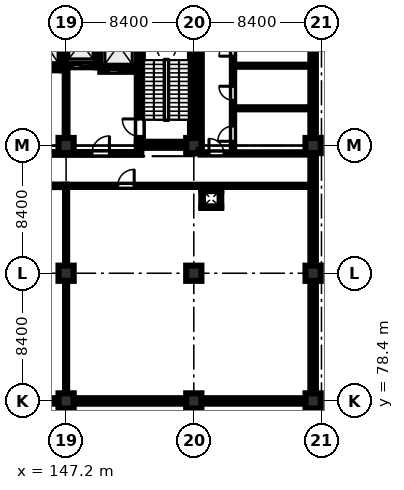
"""IFC4 building model, lengths in metres.
Left out: names, types, materials, properties, quantities, classifications, styles, units other than length and angle.
Written with IfcOpenShell. Run it as: python <this file> out.ifc"""

import sys

from ifc_helpers import new_model, si_unit, direction, frame, frame_2d, origin, origin_2d, place, context, subcontext, project, spatial, rectangle, extrude, element, fill, save


model = new_model("IFC4")
c1 = context("Model", 3, precision=1e-05, world=origin(), true_north=direction((0.0, 1.0)))
c2 = subcontext(c1, "Body", "Model", "MODEL_VIEW")
j1 = project(units=[si_unit("LENGTHUNIT", "METRE"), si_unit("PLANEANGLEUNIT", "RADIAN")], contexts=[c1])
p1 = place(None, origin())
s1 = spatial("IfcSite", under=j1, at=p1, CompositionType="ELEMENT")
p2 = place(p1, origin())
s2 = spatial("IfcBuilding", under=s1, at=p2, CompositionType="ELEMENT")
p3 = place(p2, frame((0.0, 0.0, 5.4)))
s3 = spatial("IfcBuildingStorey", under=s2, at=p3, CompositionType="ELEMENT", Elevation=5.4)
for number, where, z_axis, x_axis in (
    (1, (147.2, 78.4, 0.0), (0.0, 0.0, 1.0), (1.0, 0.0, 0.0)),
    (2, (147.2, 86.8, 0.0), (0.0, 0.0, 1.0), (1.0, 0.0, 0.0)),
    (3, (147.2, 95.2, 0.0), (0.0, 0.0, 1.0), (1.0, 0.0, 0.0)),
    (4, (155.6, 78.4, 0.0), (0.0, 0.0, 1.0), (1.0, 0.0, 0.0)),
    (5, (155.6, 86.8, 0.0), (0.0, 0.0, 1.0), (1.0, 0.0, 0.0)),
    (6, (155.6, 95.2, 0.0), (0.0, 0.0, 1.0), (1.0, 0.0, 0.0)),
    (7, (163.45, 78.4, 0.0), (0.0, 0.0, 1.0), (1.0, 0.0, 0.0)),
    (8, (163.45, 86.8, 0.0), (0.0, 0.0, 1.0), (1.0, 0.0, 0.0)),
    (9, (163.45, 95.2, 0.0), (0.0, 0.0, 1.0), (1.0, 0.0, 0.0)),
):
    element("IfcColumn", number, at=place(p3, frame(where, z_axis=z_axis, x_axis=x_axis)), inside=s3, PredefinedType="COLUMN", context=c2, shape_type="SweptSolid", body=[
        extrude(rectangle(XDim=1.0, YDim=1.0, at=origin_2d()), origin(), (0.0, 0.0, 1.0), 4.58),
    ])
p4 = place(p3, frame((151.85, 95.25, 0.0), z_axis=(0.0, 0.0, 1.0), x_axis=(1.0, 0.0, 0.0)))
e10 = element("IfcWall", 10, at=p4, inside=s3, PredefinedType="SHEAR", context=c2, shape_type="SweptSolid", body=[
    extrude(rectangle(XDim=3.9, YDim=0.4, at=frame_2d((1.95, 0.0))), origin(), (0.0, 0.0, 1.0), 4.58),
])
p5 = place(p3, frame((152.05, 95.45, 0.0), z_axis=(0.0, 0.0, 1.0), x_axis=(0.0, 1.0, 0.0)))
e11 = element("IfcWall", 11, at=p5, inside=s3, PredefinedType="SHEAR", context=c2, shape_type="SweptSolid", body=[
    extrude(rectangle(XDim=7.9, YDim=0.4, at=frame_2d((3.95, 0.0))), origin(), (0.0, 0.0, 1.0), 4.58),
])
p6 = place(p5, frame((0.35, 0.0, 0.0)))
e12 = element("IfcOpeningElement", 12, at=p6, cuts=e11, PredefinedType="OPENING", context=c2, shape_type="SweptSolid", body=[
    extrude(rectangle(XDim=1.15, YDim=2.15, at=frame_2d((0.575, 1.075))), frame((0.0, 0.21, 0.0), z_axis=(0.0, -1.0, 0.0), x_axis=(1.0, 0.0, 0.0)), (0.0, 0.0, 1.0), 0.42),
])
p7 = place(p3, frame((155.55, 95.45, 0.0), z_axis=(0.0, 0.0, 1.0), x_axis=(0.0, 1.0, 0.0)))
e13 = element("IfcWall", 13, at=p7, inside=s3, PredefinedType="SHEAR", context=c2, shape_type="SweptSolid", body=[
    extrude(rectangle(XDim=7.9, YDim=0.4, at=frame_2d((3.95, 0.0))), origin(), (0.0, 0.0, 1.0), 4.58),
])
p8 = place(p3, frame((144.85, 100.275, 0.0), z_axis=(0.0, 0.0, 1.0), x_axis=(1.0, 0.0, 0.0)))
e14 = element("IfcWall", 14, at=p8, inside=s3, PredefinedType="SHEAR", context=c2, shape_type="SweptSolid", body=[
    extrude(rectangle(XDim=2.05, YDim=0.25, at=frame_2d((1.025, 0.0))), origin(), (0.0, 0.0, 1.0), 4.58),
])
p9 = place(p8, frame((0.465, 0.0, 0.0)))
e15 = element("IfcOpeningElement", 15, at=p9, cuts=e14, PredefinedType="OPENING", context=c2, shape_type="SweptSolid", body=[
    extrude(rectangle(XDim=1.12, YDim=2.15, at=frame_2d((0.56, 1.075))), frame((0.0, 0.135, 0.0), z_axis=(0.0, -1.0, 0.0), x_axis=(1.0, 0.0, 0.0)), (0.0, 0.0, 1.0), 0.27),
])
p10 = place(p3, frame((147.025, 100.15, 0.0), z_axis=(0.0, 0.0, 1.0), x_axis=(0.0, 1.0, 0.0)))
e16 = element("IfcWall", 16, at=p10, inside=s3, PredefinedType="SHEAR", context=c2, shape_type="SweptSolid", body=[
    extrude(rectangle(XDim=3.4, YDim=0.25, at=frame_2d((1.7, 0.0))), origin(), (0.0, 0.0, 1.0), 4.58),
])
p11 = place(p3, frame((147.15, 100.475, 0.0), z_axis=(0.0, 0.0, 1.0), x_axis=(1.0, 0.0, 0.0)))
e17 = element("IfcWall", 17, at=p11, inside=s3, PredefinedType="SHEAR", context=c2, shape_type="SweptSolid", body=[
    extrude(rectangle(XDim=2.05, YDim=0.25, at=frame_2d((1.025, 0.0))), origin(), (0.0, 0.0, 1.0), 4.58),
])
p12 = place(p11, frame((0.495, 0.0, 0.0)))
e18 = element("IfcOpeningElement", 18, at=p12, cuts=e17, PredefinedType="OPENING", context=c2, shape_type="SweptSolid", body=[
    extrude(rectangle(XDim=1.06, YDim=2.15, at=frame_2d((0.53, 1.075))), frame((0.0, 0.135, 0.0), z_axis=(0.0, -1.0, 0.0), x_axis=(1.0, 0.0, 0.0)), (0.0, 0.0, 1.0), 0.27),
])
p13 = place(p3, frame((149.325, 100.35, 0.0), z_axis=(0.0, 0.0, 1.0), x_axis=(0.0, 1.0, 0.0)))
e19 = element("IfcWall", 19, at=p13, inside=s3, PredefinedType="SHEAR", context=c2, shape_type="SweptSolid", body=[
    extrude(rectangle(XDim=3.2, YDim=0.25, at=frame_2d((1.6, 0.0))), origin(), (0.0, 0.0, 1.0), 4.58),
])
p14 = place(p3, frame((149.45, 100.175, 0.0), z_axis=(0.0, 0.0, 1.0), x_axis=(1.0, 0.0, 0.0)))
e20 = element("IfcWall", 20, at=p14, inside=s3, PredefinedType="SHEAR", context=c2, shape_type="SweptSolid", body=[
    extrude(rectangle(XDim=2.4, YDim=0.25, at=frame_2d((1.2, 0.0))), origin(), (0.0, 0.0, 1.0), 4.58),
])
p15 = place(p14, frame((0.55, 0.0, 0.0)))
e21 = element("IfcOpeningElement", 21, at=p15, cuts=e20, PredefinedType="OPENING", context=c2, shape_type="SweptSolid", body=[
    extrude(rectangle(XDim=1.3, YDim=2.25, at=frame_2d((0.65, 1.125))), frame((0.0, 0.135, 0.0), z_axis=(0.0, -1.0, 0.0), x_axis=(1.0, 0.0, 0.0)), (0.0, 0.0, 1.0), 0.27),
])
p16 = place(p3, frame((146.7, 78.4, 0.0), z_axis=(0.0, 0.0, 1.0), x_axis=(-1.0, 0.0, 0.0)))
e22 = element("IfcWall", 22, at=p16, inside=s3, PredefinedType="STANDARD", context=c2, shape_type="SweptSolid", body=[
    extrude(rectangle(XDim=7.4, YDim=0.36, at=frame_2d((3.7, 0.0))), origin(), (0.0, 0.0, 1.0), 3.83),
])
p17 = place(p16, frame((1.15, 0.0, 0.95)))
e23 = element("IfcOpeningElement", 23, at=p17, cuts=e22, PredefinedType="OPENING", context=c2, shape_type="SweptSolid", body=[
    extrude(rectangle(XDim=1.5, YDim=1.5, at=frame_2d((0.75, 0.75))), frame((0.0, 0.19, 0.0), z_axis=(0.0, -1.0, 0.0), x_axis=(1.0, 0.0, 0.0)), (0.0, 0.0, 1.0), 0.38),
])
p18 = place(p3, frame((155.1, 78.4, 0.0), z_axis=(0.0, 0.0, 1.0), x_axis=(-1.0, 0.0, 0.0)))
e24 = element("IfcWall", 24, at=p18, inside=s3, PredefinedType="STANDARD", context=c2, shape_type="SweptSolid", body=[
    extrude(rectangle(XDim=7.4, YDim=0.36, at=frame_2d((3.7, 0.0))), origin(), (0.0, 0.0, 1.0), 3.83),
])
p19 = place(p18, frame((1.15, 0.0, 0.95)))
e25 = element("IfcOpeningElement", 25, at=p19, cuts=e24, PredefinedType="OPENING", context=c2, shape_type="SweptSolid", body=[
    extrude(rectangle(XDim=1.5, YDim=1.5, at=frame_2d((0.75, 0.75))), frame((0.0, 0.19, 0.0), z_axis=(0.0, -1.0, 0.0), x_axis=(1.0, 0.0, 0.0)), (0.0, 0.0, 1.0), 0.38),
])
p20 = place(p3, frame((162.95, 78.4, 0.0), z_axis=(0.0, 0.0, 1.0), x_axis=(-1.0, 0.0, 0.0)))
e26 = element("IfcWall", 26, at=p20, inside=s3, PredefinedType="STANDARD", context=c2, shape_type="SweptSolid", body=[
    extrude(rectangle(XDim=6.85, YDim=0.36, at=frame_2d((3.425, 0.0))), origin(), (0.0, 0.0, 1.0), 3.83),
])
p21 = place(p20, frame((1.15, 0.0, 0.95)))
e27 = element("IfcOpeningElement", 27, at=p21, cuts=e26, PredefinedType="OPENING", context=c2, shape_type="SweptSolid", body=[
    extrude(rectangle(XDim=1.5, YDim=1.5, at=frame_2d((0.75, 0.75))), frame((0.0, 0.19, 0.0), z_axis=(0.0, -1.0, 0.0), x_axis=(1.0, 0.0, 0.0)), (0.0, 0.0, 1.0), 0.38),
])
p22 = place(p3, frame((163.45, 86.3, 0.0), z_axis=(0.0, 0.0, 1.0), x_axis=(0.0, -1.0, 0.0)))
e28 = element("IfcWall", 28, at=p22, inside=s3, PredefinedType="STANDARD", context=c2, shape_type="SweptSolid", body=[
    extrude(rectangle(XDim=7.4, YDim=0.36, at=frame_2d((3.7, 0.0))), origin(), (0.0, 0.0, 1.0), 3.83),
])
p23 = place(p22, frame((1.15, 0.0, 1.1)))
e29 = element("IfcOpeningElement", 29, at=p23, cuts=e28, PredefinedType="OPENING", context=c2, shape_type="SweptSolid", body=[
    extrude(rectangle(XDim=1.8, YDim=1.8, at=frame_2d((0.9, 0.9))), frame((0.0, 0.19, 0.0), z_axis=(0.0, -1.0, 0.0), x_axis=(1.0, 0.0, 0.0)), (0.0, 0.0, 1.0), 0.38),
])
p24 = place(p3, frame((163.45, 94.7, 0.0), z_axis=(0.0, 0.0, 1.0), x_axis=(0.0, -1.0, 0.0)))
e30 = element("IfcWall", 30, at=p24, inside=s3, PredefinedType="STANDARD", context=c2, shape_type="SweptSolid", body=[
    extrude(rectangle(XDim=7.4, YDim=0.36, at=frame_2d((3.7, 0.0))), origin(), (0.0, 0.0, 1.0), 3.83),
])
p25 = place(p24, frame((4.2, 0.0, 1.1)))
e31 = element("IfcOpeningElement", 31, at=p25, cuts=e30, PredefinedType="OPENING", context=c2, shape_type="SweptSolid", body=[
    extrude(rectangle(XDim=1.8, YDim=1.8, at=frame_2d((0.9, 0.9))), frame((0.0, 0.19, 0.0), z_axis=(0.0, -1.0, 0.0), x_axis=(1.0, 0.0, 0.0)), (0.0, 0.0, 1.0), 0.38),
])
p26 = place(p3, frame((163.45, 103.1, 0.0), z_axis=(0.0, 0.0, 1.0), x_axis=(0.0, -1.0, 0.0)))
e32 = element("IfcWall", 32, at=p26, inside=s3, PredefinedType="STANDARD", context=c2, shape_type="SweptSolid", body=[
    extrude(rectangle(XDim=7.4, YDim=0.36, at=frame_2d((3.7, 0.0))), origin(), (0.0, 0.0, 1.0), 3.83),
])
p27 = place(p26, frame((1.15, 0.0, 1.1)))
e33 = element("IfcOpeningElement", 33, at=p27, cuts=e32, PredefinedType="OPENING", context=c2, shape_type="SweptSolid", body=[
    extrude(rectangle(XDim=1.4, YDim=1.4, at=frame_2d((0.7, 0.7))), frame((0.0, 0.19, 0.0), z_axis=(0.0, -1.0, 0.0), x_axis=(1.0, 0.0, 0.0)), (0.0, 0.0, 1.0), 0.38),
])
for number, where, z_axis, x_axis in (
    (34, (147.185, 49.68, 0.0), (0.0, 0.0, 1.0), (0.0, 1.0, 0.0)),
    (35, (155.615, 78.22, 0.0), (0.0, 0.0, 1.0), (0.0, -1.0, 0.0)),
):
    element("IfcWall", number, at=place(p3, frame(where, z_axis=z_axis, x_axis=x_axis)), inside=s3, PredefinedType="PARAPET", context=c2, shape_type="SweptSolid", body=[
        extrude(rectangle(XDim=28.54, YDim=0.19, at=frame_2d((14.27, 0.0))), origin(), (0.0, 0.0, 1.0), 1.2),
    ])
p28 = place(p3, frame((142.3, 94.68, 0.0), z_axis=(0.0, 0.0, 1.0), x_axis=(1.0, 0.0, 0.0)))
e36 = element("IfcWall", 36, at=p28, inside=s3, PredefinedType="STANDARD", context=c2, shape_type="SweptSolid", body=[
    extrude(rectangle(XDim=4.8, YDim=0.18, at=frame_2d((2.4, 0.0))), origin(), (0.0, 0.0, 1.0), 4.58),
])
p29 = place(p28, frame((1.6, 0.0, 0.0)))
e37 = element("IfcOpeningElement", 37, at=p29, cuts=e36, PredefinedType="OPENING", context=c2, shape_type="SweptSolid", body=[
    extrude(rectangle(XDim=1.15, YDim=2.15, at=frame_2d((0.575, 1.075))), frame((0.0, 0.1, 0.0), z_axis=(0.0, -1.0, 0.0), x_axis=(1.0, 0.0, 0.0)), (0.0, 0.0, 1.0), 0.2),
])
p30 = place(p3, frame((147.3, 94.68, 0.0), z_axis=(0.0, 0.0, 1.0), x_axis=(1.0, 0.0, 0.0)))
e38 = element("IfcWall", 38, at=p30, inside=s3, PredefinedType="STANDARD", context=c2, shape_type="SweptSolid", body=[
    extrude(rectangle(XDim=4.85, YDim=0.18, at=frame_2d((2.425, 0.0))), origin(), (0.0, 0.0, 1.0), 4.58),
])
p31 = place(p30, frame((1.6, 0.0, 0.0)))
e39 = element("IfcOpeningElement", 39, at=p31, cuts=e38, PredefinedType="OPENING", context=c2, shape_type="SweptSolid", body=[
    extrude(rectangle(XDim=1.15, YDim=2.15, at=frame_2d((0.575, 1.075))), frame((0.0, 0.1, 0.0), z_axis=(0.0, -1.0, 0.0), x_axis=(1.0, 0.0, 0.0)), (0.0, 0.0, 1.0), 0.2),
])
p32 = place(p3, frame((147.2, 95.75, 0.0), z_axis=(0.0, 0.0, 1.0), x_axis=(0.0, 1.0, 0.0)))
e40 = element("IfcWall", 40, at=p32, inside=s3, PredefinedType="STANDARD", context=c2, shape_type="SweptSolid", body=[
    extrude(rectangle(XDim=4.5, YDim=0.18, at=frame_2d((2.25, 0.0))), origin(), (0.0, 0.0, 1.0), 3.83),
])
p33 = place(p3, frame((156.05, 94.68, 0.0), z_axis=(0.0, 0.0, 1.0), x_axis=(1.0, 0.0, 0.0)))
e41 = element("IfcWall", 41, at=p33, inside=s3, PredefinedType="PARTITIONING", context=c2, shape_type="SweptSolid", body=[
    extrude(rectangle(XDim=7.15, YDim=0.15, at=frame_2d((3.575, 0.0))), origin(), (0.0, 0.0, 1.0), 4.58),
])
p34 = place(p33, frame((0.55, 0.0, 0.0)))
e42 = element("IfcOpeningElement", 42, at=p34, cuts=e41, PredefinedType="OPENING", context=c2, shape_type="SweptSolid", body=[
    extrude(rectangle(XDim=0.98, YDim=2.12, at=frame_2d((0.49, 1.06))), frame((0.0, 0.085, 0.0), z_axis=(0.0, -1.0, 0.0), x_axis=(1.0, 0.0, 0.0)), (0.0, 0.0, 1.0), 0.17),
])
p35 = place(p3, frame((158.18, 94.68, 0.0), z_axis=(0.0, 0.0, 1.0), x_axis=(0.0, 1.0, 0.0)))
e43 = element("IfcWall", 43, at=p35, inside=s3, PredefinedType="PARTITIONING", context=c2, shape_type="SweptSolid", body=[
    extrude(rectangle(XDim=8.57, YDim=0.15, at=frame_2d((4.285, 0.0))), origin(), (0.0, 0.0, 1.0), 4.58),
])
p36 = place(p35, frame((0.8, 0.0, 0.0)))
e44 = element("IfcOpeningElement", 44, at=p36, cuts=e43, PredefinedType="OPENING", context=c2, shape_type="SweptSolid", body=[
    extrude(rectangle(XDim=1.0, YDim=2.12, at=frame_2d((0.5, 1.06))), frame((0.0, 0.085, 0.0), z_axis=(0.0, -1.0, 0.0), x_axis=(1.0, 0.0, 0.0)), (0.0, 0.0, 1.0), 0.17),
])
p37 = place(p35, frame((3.5, 0.0, 0.0)))
e45 = element("IfcOpeningElement", 45, at=p37, cuts=e43, PredefinedType="OPENING", context=c2, shape_type="SweptSolid", body=[
    extrude(rectangle(XDim=0.92, YDim=2.1, at=frame_2d((0.46, 1.05))), frame((0.0, 0.085, 0.0), z_axis=(0.0, -1.0, 0.0), x_axis=(1.0, 0.0, 0.0)), (0.0, 0.0, 1.0), 0.17),
])
p38 = place(p35, frame((6.4, 0.0, 0.0)))
e46 = element("IfcOpeningElement", 46, at=p38, cuts=e43, PredefinedType="OPENING", context=c2, shape_type="SweptSolid", body=[
    extrude(rectangle(XDim=0.92, YDim=2.1, at=frame_2d((0.46, 1.05))), frame((0.0, 0.085, 0.0), z_axis=(0.0, -1.0, 0.0), x_axis=(1.0, 0.0, 0.0)), (0.0, 0.0, 1.0), 0.17),
])
for number, where, z_axis, x_axis in (
    (47, (158.18, 97.65, 0.0), (0.0, 0.0, 1.0), (1.0, 0.0, 0.0)),
    (48, (158.18, 100.45, 0.0), (0.0, 0.0, 1.0), (1.0, 0.0, 0.0)),
):
    element("IfcWall", number, at=place(p3, frame(where, z_axis=z_axis, x_axis=x_axis)), inside=s3, PredefinedType="PARTITIONING", context=c2, shape_type="SweptSolid", body=[
        extrude(rectangle(XDim=5.02, YDim=0.135, at=frame_2d((2.51, 0.0))), origin(), (0.0, 0.0, 1.0), 4.58),
    ])
p39 = place(p3, frame((156.05, 94.68, 0.0), z_axis=(0.0, 0.0, 1.0), x_axis=(0.0, 1.0, 0.0)))
e49 = element("IfcWall", 49, at=p39, inside=s3, PredefinedType="PARTITIONING", context=c2, shape_type="SweptSolid", body=[
    extrude(rectangle(XDim=8.57, YDim=0.15, at=frame_2d((4.285, 0.0))), origin(), (0.0, 0.0, 1.0), 4.58),
])
p40 = place(p3, frame((134.6, 92.55, 0.0), z_axis=(0.0, 0.0, 1.0), x_axis=(1.0, 0.0, 0.0)))
e50 = element("IfcWall", 50, at=p40, inside=s3, PredefinedType="PARTITIONING", context=c2, shape_type="SweptSolid", body=[
    extrude(rectangle(XDim=12.6, YDim=0.165, at=frame_2d((6.3, 0.0))), origin(), (0.0, 0.0, 1.0), 4.58),
])
p41 = place(p40, frame((6.8, 0.0, 0.0)))
e51 = element("IfcOpeningElement", 51, at=p41, cuts=e50, PredefinedType="OPENING", context=c2, shape_type="SweptSolid", body=[
    extrude(rectangle(XDim=1.7, YDim=2.2, at=frame_2d((0.85, 1.1))), frame((0.0, 0.093, 0.0), z_axis=(0.0, -1.0, 0.0), x_axis=(1.0, 0.0, 0.0)), (0.0, 0.0, 1.0), 0.185),
])
p42 = place(p3, frame((147.2, 92.55, 0.0), z_axis=(0.0, 0.0, 1.0), x_axis=(1.0, 0.0, 0.0)))
e52 = element("IfcWall", 52, at=p42, inside=s3, PredefinedType="PARTITIONING", context=c2, shape_type="SweptSolid", body=[
    extrude(rectangle(XDim=16.15, YDim=0.145, at=frame_2d((8.075, 0.0))), origin(), (0.0, 0.0, 1.0), 4.58),
])
p43 = place(p42, frame((3.4, 0.0, 0.0)))
e53 = element("IfcOpeningElement", 53, at=p43, cuts=e52, PredefinedType="OPENING", context=c2, shape_type="SweptSolid", body=[
    extrude(rectangle(XDim=1.08, YDim=2.15, at=frame_2d((0.54, 1.075))), frame((0.0, 0.083, 0.0), z_axis=(0.0, -1.0, 0.0), x_axis=(1.0, 0.0, 0.0)), (0.0, 0.0, 1.0), 0.165),
])
p44 = place(p3, frame((147.2, 78.55, 0.0), z_axis=(0.0, 0.0, 1.0), x_axis=(0.0, 1.0, 0.0)))
e54 = element("IfcWall", 54, at=p44, inside=s3, PredefinedType="PARTITIONING", context=c2, shape_type="SweptSolid", body=[
    extrude(rectangle(XDim=14.0, YDim=0.135, at=frame_2d((7.0, 0.0))), origin(), (0.0, 0.0, 1.0), 3.83),
])
for number, where, z_axis, x_axis in (
    (55, (156.095, 91.147, 0.0), (0.0, 0.0, 1.0), (1.0, 0.0, 0.0)),
    (56, (156.095, 92.252, 0.0), (0.0, 0.0, 1.0), (1.0, 0.0, 0.0)),
):
    element("IfcWall", number, at=place(p3, frame(where, z_axis=z_axis, x_axis=x_axis)), inside=s3, PredefinedType="PARTITIONING", context=c2, shape_type="SweptSolid", body=[
        extrude(rectangle(XDim=1.31, YDim=0.105, at=frame_2d((0.655, 0.0))), origin(), (0.0, 0.0, 1.0), 4.58),
    ])
for number, where, z_axis, x_axis in (
    (57, (156.147, 91.2, 0.0), (0.0, 0.0, 1.0), (0.0, 1.0, 0.0)),
    (58, (157.353, 91.2, 0.0), (0.0, 0.0, 1.0), (0.0, 1.0, 0.0)),
):
    element("IfcWall", number, at=place(p3, frame(where, z_axis=z_axis, x_axis=x_axis)), inside=s3, PredefinedType="PARTITIONING", context=c2, shape_type="SweptSolid", body=[
        extrude(rectangle(XDim=1.0, YDim=0.105, at=frame_2d((0.5, 0.0))), origin(), (0.0, 0.0, 1.0), 4.58),
    ])
p45 = place(p19, origin())
e59 = element("IfcWindow", 59, at=p45, inside=s3, PartitioningType="DOUBLE_PANEL_VERTICAL", PredefinedType="WINDOW", context=c2, shape_type="SweptSolid", body=[
    extrude(rectangle(XDim=1.5, YDim=1.5, at=frame_2d((0.75, 0.75))), frame((0.0, 0.03, 0.0), z_axis=(0.0, -1.0, 0.0), x_axis=(1.0, 0.0, 0.0)), (0.0, 0.0, 1.0), 0.06),
])
fill(e25, e59)
p46 = place(p21, origin())
e60 = element("IfcWindow", 60, at=p46, inside=s3, PartitioningType="DOUBLE_PANEL_VERTICAL", PredefinedType="WINDOW", context=c2, shape_type="SweptSolid", body=[
    extrude(rectangle(XDim=1.5, YDim=1.5, at=frame_2d((0.75, 0.75))), frame((0.0, 0.03, 0.0), z_axis=(0.0, -1.0, 0.0), x_axis=(1.0, 0.0, 0.0)), (0.0, 0.0, 1.0), 0.06),
])
fill(e27, e60)
p47 = place(p23, origin())
e61 = element("IfcWindow", 61, at=p47, inside=s3, PartitioningType="DOUBLE_PANEL_VERTICAL", PredefinedType="WINDOW", context=c2, shape_type="SweptSolid", body=[
    extrude(rectangle(XDim=1.8, YDim=1.8, at=frame_2d((0.9, 0.9))), frame((0.0, 0.03, 0.0), z_axis=(0.0, -1.0, 0.0), x_axis=(1.0, 0.0, 0.0)), (0.0, 0.0, 1.0), 0.06),
])
fill(e29, e61)
p48 = place(p25, origin())
e62 = element("IfcWindow", 62, at=p48, inside=s3, PartitioningType="DOUBLE_PANEL_VERTICAL", PredefinedType="WINDOW", context=c2, shape_type="SweptSolid", body=[
    extrude(rectangle(XDim=1.8, YDim=1.8, at=frame_2d((0.9, 0.9))), frame((0.0, 0.03, 0.0), z_axis=(0.0, -1.0, 0.0), x_axis=(1.0, 0.0, 0.0)), (0.0, 0.0, 1.0), 0.06),
])
fill(e31, e62)
p49 = place(p27, origin())
e63 = element("IfcWindow", 63, at=p49, inside=s3, PartitioningType="SINGLE_PANEL", PredefinedType="WINDOW", context=c2, shape_type="SweptSolid", body=[
    extrude(rectangle(XDim=1.4, YDim=1.4, at=frame_2d((0.7, 0.7))), frame((0.0, 0.03, 0.0), z_axis=(0.0, -1.0, 0.0), x_axis=(1.0, 0.0, 0.0)), (0.0, 0.0, 1.0), 0.06),
])
fill(e33, e63)
p50 = place(p31, origin())
e64 = element("IfcDoor", 64, at=p50, inside=s3, OperationType="SINGLE_SWING_RIGHT", PredefinedType="DOOR", context=c2, shape_type="SweptSolid", body=[
    extrude(rectangle(XDim=1.15, YDim=2.15, at=frame_2d((0.575, 1.075))), frame((0.0, 0.025, 0.0), z_axis=(0.0, -1.0, 0.0), x_axis=(1.0, 0.0, 0.0)), (0.0, 0.0, 1.0), 0.05),
])
fill(e39, e64)
p51 = place(p34, origin())
e65 = element("IfcDoor", 65, at=p51, inside=s3, OperationType="SINGLE_SWING_LEFT", PredefinedType="DOOR", context=c2, shape_type="SweptSolid", body=[
    extrude(rectangle(XDim=0.98, YDim=2.12, at=frame_2d((0.49, 1.06))), frame((0.0, 0.025, 0.0), z_axis=(0.0, -1.0, 0.0), x_axis=(1.0, 0.0, 0.0)), (0.0, 0.0, 1.0), 0.05),
])
fill(e42, e65)
p52 = place(p36, origin())
e66 = element("IfcDoor", 66, at=p52, inside=s3, OperationType="SINGLE_SWING_LEFT", PredefinedType="DOOR", context=c2, shape_type="SweptSolid", body=[
    extrude(rectangle(XDim=1.0, YDim=2.12, at=frame_2d((0.5, 1.06))), frame((0.0, 0.025, 0.0), z_axis=(0.0, -1.0, 0.0), x_axis=(1.0, 0.0, 0.0)), (0.0, 0.0, 1.0), 0.05),
])
fill(e44, e66)
p53 = place(p37, origin())
e67 = element("IfcDoor", 67, at=p53, inside=s3, OperationType="SINGLE_SWING_RIGHT", PredefinedType="DOOR", context=c2, shape_type="SweptSolid", body=[
    extrude(rectangle(XDim=0.92, YDim=2.1, at=frame_2d((0.46, 1.05))), frame((0.0, 0.025, 0.0), z_axis=(0.0, -1.0, 0.0), x_axis=(1.0, 0.0, 0.0)), (0.0, 0.0, 1.0), 0.05),
])
fill(e45, e67)
p54 = place(p38, origin())
e68 = element("IfcDoor", 68, at=p54, inside=s3, OperationType="SINGLE_SWING_LEFT", PredefinedType="DOOR", context=c2, shape_type="SweptSolid", body=[
    extrude(rectangle(XDim=0.92, YDim=2.1, at=frame_2d((0.46, 1.05))), frame((0.0, 0.025, 0.0), z_axis=(0.0, -1.0, 0.0), x_axis=(1.0, 0.0, 0.0)), (0.0, 0.0, 1.0), 0.05),
])
fill(e46, e68)
p55 = place(p43, origin())
e69 = element("IfcDoor", 69, at=p55, inside=s3, OperationType="SINGLE_SWING_RIGHT", PredefinedType="DOOR", context=c2, shape_type="SweptSolid", body=[
    extrude(rectangle(XDim=1.08, YDim=2.15, at=frame_2d((0.54, 1.075))), frame((0.0, 0.025, 0.0), z_axis=(0.0, -1.0, 0.0), x_axis=(1.0, 0.0, 0.0)), (0.0, 0.0, 1.0), 0.05),
])
fill(e53, e69)
p56 = place(p6, origin())
e70 = element("IfcDoor", 70, at=p56, inside=s3, OperationType="SINGLE_SWING_RIGHT", PredefinedType="DOOR", context=c2, shape_type="SweptSolid", body=[
    extrude(rectangle(XDim=1.15, YDim=2.15, at=frame_2d((0.575, 1.075))), frame((0.0, 0.025, 0.0), z_axis=(0.0, -1.0, 0.0), x_axis=(1.0, 0.0, 0.0)), (0.0, 0.0, 1.0), 0.05),
])
fill(e12, e70)
p57 = place(p9, origin())
e71 = element("IfcDoor", 71, at=p57, inside=s3, OperationType="SLIDING_TO_LEFT", PredefinedType="DOOR", context=c2, shape_type="SweptSolid", body=[
    extrude(rectangle(XDim=1.12, YDim=2.15, at=frame_2d((0.56, 1.075))), frame((0.0, 0.025, 0.0), z_axis=(0.0, -1.0, 0.0), x_axis=(1.0, 0.0, 0.0)), (0.0, 0.0, 1.0), 0.05),
])
fill(e15, e71)
p58 = place(p12, origin())
e72 = element("IfcDoor", 72, at=p58, inside=s3, OperationType="SLIDING_TO_LEFT", PredefinedType="DOOR", context=c2, shape_type="SweptSolid", body=[
    extrude(rectangle(XDim=1.06, YDim=2.15, at=frame_2d((0.53, 1.075))), frame((0.0, 0.025, 0.0), z_axis=(0.0, -1.0, 0.0), x_axis=(1.0, 0.0, 0.0)), (0.0, 0.0, 1.0), 0.05),
])
fill(e18, e72)
p59 = place(p15, origin())
e73 = element("IfcDoor", 73, at=p59, inside=s3, OperationType="SLIDING_TO_LEFT", PredefinedType="DOOR", context=c2, shape_type="SweptSolid", body=[
    extrude(rectangle(XDim=1.3, YDim=2.25, at=frame_2d((0.65, 1.125))), frame((0.0, 0.025, 0.0), z_axis=(0.0, -1.0, 0.0), x_axis=(1.0, 0.0, 0.0)), (0.0, 0.0, 1.0), 0.05),
])
fill(e21, e73)
save(model, sys.argv[1])
